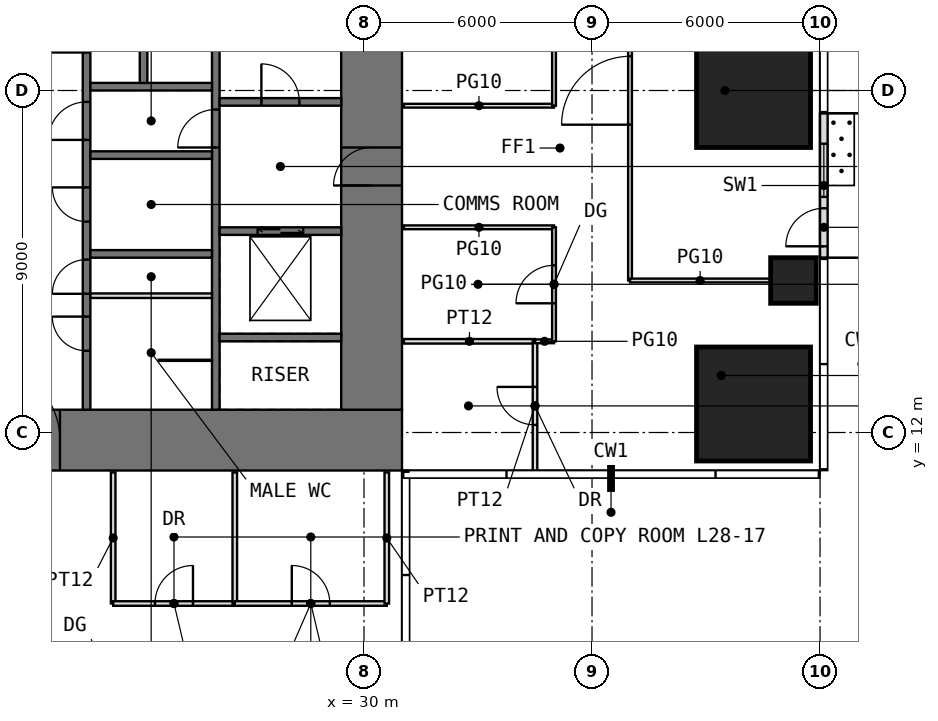
"""IFC4 building model, lengths in metres.
Left out: names, types, materials, properties, quantities, classifications, styles, units other than length and angle.
Written with IfcOpenShell. Run it as: python <this file> out.ifc"""

import sys

from ifc_helpers import new_model, si_unit, direction, frame, frame_2d, origin, origin_2d, place, context, subcontext, project, spatial, rectangle, extrude, element, fill, save


model = new_model("IFC4")
c1 = context("Model", 3, precision=1e-05, world=origin(), true_north=direction((0.0, 1.0)))
c2 = subcontext(c1, "Body", "Model", "MODEL_VIEW")
j1 = project(units=[si_unit("LENGTHUNIT", "METRE"), si_unit("PLANEANGLEUNIT", "RADIAN")], contexts=[c1])
p1 = place(None, origin())
s1 = spatial("IfcSite", under=j1, at=p1, CompositionType="ELEMENT")
p2 = place(p1, origin())
s2 = spatial("IfcBuilding", under=s1, at=p2, CompositionType="ELEMENT")
p3 = place(p2, frame((0.0, 0.0, 120.5)))
s3 = spatial("IfcBuildingStorey", under=s2, at=p3, CompositionType="ELEMENT", Elevation=120.5)
p4 = place(p3, frame((40.25, 12.75, 0.0), z_axis=(0.0, 0.0, 1.0), x_axis=(1.0, 0.0, 0.0)))
e1 = element("IfcColumn", 1, at=p4, inside=s3, PredefinedType="COLUMN", context=c2, shape_type="SweptSolid", body=[
    extrude(rectangle(XDim=3.0, YDim=3.0, at=origin_2d()), origin(), (0.0, 0.0, 1.0), 4.0),
])
p5 = place(p3, frame((41.3, 16.0, 0.0), z_axis=(0.0, 0.0, 1.0), x_axis=(1.0, 0.0, 0.0)))
e2 = element("IfcColumn", 2, at=p5, inside=s3, PredefinedType="COLUMN", context=c2, shape_type="SweptSolid", body=[
    extrude(rectangle(XDim=1.2, YDim=1.2, at=origin_2d()), origin(), (0.0, 0.0, 1.0), 4.0),
])
p6 = place(p3, frame((40.25, 21.0, 0.0), z_axis=(0.0, 0.0, 1.0), x_axis=(1.0, 0.0, 0.0)))
e3 = element("IfcColumn", 3, at=p6, inside=s3, PredefinedType="COLUMN", context=c2, shape_type="SweptSolid", body=[
    extrude(rectangle(XDim=3.0, YDim=3.0, at=origin_2d()), origin(), (0.0, 0.0, 1.0), 4.0),
])
p7 = place(p3, frame((42.1, 16.6, 0.0), z_axis=(0.0, 0.0, 1.0), x_axis=(0.0, 1.0, 0.0)))
e4 = element("IfcWall", 4, at=p7, inside=s3, PredefinedType="USERDEFINED", context=c2, shape_type="SweptSolid", body=[
    extrude(rectangle(XDim=3.8, YDim=0.2, at=frame_2d((1.9, 0.0))), origin(), (0.0, 0.0, 1.0), 3.75),
])
p8 = place(p7, frame((0.3, 0.0, 0.0)))
e5 = element("IfcOpeningElement", 5, at=p8, cuts=e4, PredefinedType="OPENING", context=c2, shape_type="SweptSolid", body=[
    extrude(rectangle(XDim=1.0, YDim=2.4, at=frame_2d((0.5, 1.2))), frame((0.0, 0.11, 0.0), z_axis=(0.0, -1.0, 0.0), x_axis=(1.0, 0.0, 0.0)), (0.0, 0.0, 1.0), 0.22),
])
p9 = place(p7, frame((1.6, 0.0, 0.3)))
e6 = element("IfcOpeningElement", 6, at=p9, cuts=e4, PredefinedType="OPENING", context=c2, shape_type="SweptSolid", body=[
    extrude(rectangle(XDim=1.4, YDim=2.7, at=frame_2d((0.7, 1.35))), frame((0.0, 0.11, 0.0), z_axis=(0.0, -1.0, 0.0), x_axis=(1.0, 0.0, 0.0)), (0.0, 0.0, 1.0), 0.22),
])
p10 = place(p3, frame((11.0, 11.8, -0.05), z_axis=(0.0, 0.0, 1.0), x_axis=(1.0, 0.0, 0.0)))
e7 = element("IfcWall", 7, at=p10, inside=s3, PredefinedType="SHEAR", context=c2, shape_type="SweptSolid", body=[
    extrude(rectangle(XDim=20.0, YDim=1.6, at=frame_2d((10.0, 0.0))), origin(), (0.0, 0.0, 1.0), 4.0),
])
p11 = place(p10, frame((9.0, 0.0, 0.05)))
e8 = element("IfcOpeningElement", 8, at=p11, cuts=e7, PredefinedType="OPENING", context=c2, shape_type="SweptSolid", body=[
    extrude(rectangle(XDim=2.0, YDim=2.2, at=frame_2d((1.0, 1.1))), frame((0.0, 0.81, 0.0), z_axis=(0.0, -1.0, 0.0), x_axis=(1.0, 0.0, 0.0)), (0.0, 0.0, 1.0), 1.62),
])
p12 = place(p3, frame((30.2, 12.6, -0.05), z_axis=(0.0, 0.0, 1.0), x_axis=(0.0, 1.0, 0.0)))
e9 = element("IfcWall", 9, at=p12, inside=s3, PredefinedType="SHEAR", context=c2, shape_type="SweptSolid", body=[
    extrude(rectangle(XDim=16.8, YDim=1.6, at=frame_2d((8.4, 0.0))), origin(), (0.0, 0.0, 1.0), 4.0),
])
p13 = place(p12, frame((5.9, 0.0, 0.05)))
e10 = element("IfcOpeningElement", 10, at=p13, cuts=e9, PredefinedType="OPENING", context=c2, shape_type="SweptSolid", body=[
    extrude(rectangle(XDim=1.0, YDim=2.2, at=frame_2d((0.5, 1.1))), frame((0.0, 0.81, 0.0), z_axis=(0.0, -1.0, 0.0), x_axis=(1.0, 0.0, 0.0)), (0.0, 0.0, 1.0), 1.62),
])
p14 = place(p3, frame((22.7, 12.6, -0.05), z_axis=(0.0, 0.0, 1.0), x_axis=(0.0, 1.0, 0.0)))
e11 = element("IfcWall", 11, at=p14, inside=s3, PredefinedType="SHEAR", context=c2, shape_type="SweptSolid", body=[
    extrude(rectangle(XDim=16.8, YDim=0.2, at=frame_2d((8.4, 0.0))), origin(), (0.0, 0.0, 1.0), 4.0),
])
p15 = place(p14, frame((3.05, 0.0, 0.05)))
e12 = element("IfcOpeningElement", 12, at=p15, cuts=e11, PredefinedType="OPENING", context=c2, shape_type="SweptSolid", body=[
    extrude(rectangle(XDim=0.9, YDim=2.2, at=frame_2d((0.45, 1.1))), frame((0.0, 0.11, 0.0), z_axis=(0.0, -1.0, 0.0), x_axis=(1.0, 0.0, 0.0)), (0.0, 0.0, 1.0), 0.22),
])
p16 = place(p14, frame((7.1, 0.0, 0.05)))
e13 = element("IfcOpeningElement", 13, at=p16, cuts=e11, PredefinedType="OPENING", context=c2, shape_type="SweptSolid", body=[
    extrude(rectangle(XDim=1.0, YDim=2.2, at=frame_2d((0.5, 1.1))), frame((0.0, 0.11, 0.0), z_axis=(0.0, -1.0, 0.0), x_axis=(1.0, 0.0, 0.0)), (0.0, 0.0, 1.0), 0.22),
])
p17 = place(p14, frame((1.55, 0.0, 0.05)))
e14 = element("IfcOpeningElement", 14, at=p17, cuts=e11, PredefinedType="OPENING", context=c2, shape_type="SweptSolid", body=[
    extrude(rectangle(XDim=0.9, YDim=2.2, at=frame_2d((0.45, 1.1))), frame((0.0, 0.11, 0.0), z_axis=(0.0, -1.0, 0.0), x_axis=(1.0, 0.0, 0.0)), (0.0, 0.0, 1.0), 0.22),
])
p18 = place(p14, frame((4.95, 0.0, 0.05)))
e15 = element("IfcOpeningElement", 15, at=p18, cuts=e11, PredefinedType="OPENING", context=c2, shape_type="SweptSolid", body=[
    extrude(rectangle(XDim=0.9, YDim=2.2, at=frame_2d((0.45, 1.1))), frame((0.0, 0.11, 0.0), z_axis=(0.0, -1.0, 0.0), x_axis=(1.0, 0.0, 0.0)), (0.0, 0.0, 1.0), 0.22),
])
p19 = place(p14, frame((9.4, 0.0, 0.05)))
e16 = element("IfcOpeningElement", 16, at=p19, cuts=e11, PredefinedType="OPENING", context=c2, shape_type="SweptSolid", body=[
    extrude(rectangle(XDim=1.0, YDim=2.2, at=frame_2d((0.5, 1.1))), frame((0.0, 0.11, 0.0), z_axis=(0.0, -1.0, 0.0), x_axis=(1.0, 0.0, 0.0)), (0.0, 0.0, 1.0), 0.22),
])
p20 = place(p3, frame((26.1, 12.6, -0.05), z_axis=(0.0, 0.0, 1.0), x_axis=(0.0, 1.0, 0.0)))
e17 = element("IfcWall", 17, at=p20, inside=s3, PredefinedType="SHEAR", context=c2, shape_type="SweptSolid", body=[
    extrude(rectangle(XDim=16.8, YDim=0.2, at=frame_2d((8.4, 0.0))), origin(), (0.0, 0.0, 1.0), 4.0),
])
p21 = place(p20, frame((6.9, 0.0, 0.05)))
e18 = element("IfcOpeningElement", 18, at=p21, cuts=e17, PredefinedType="OPENING", context=c2, shape_type="SweptSolid", body=[
    extrude(rectangle(XDim=1.0, YDim=2.2, at=frame_2d((0.5, 1.1))), frame((0.0, 0.11, 0.0), z_axis=(0.0, -1.0, 0.0), x_axis=(1.0, 0.0, 0.0)), (0.0, 0.0, 1.0), 0.22),
])
for number, where, z_axis, x_axis in (
    (19, (22.8, 16.7, -0.05), (0.0, 0.0, 1.0), (1.0, 0.0, 0.0)),
    (20, (22.8, 19.3, -0.05), (0.0, 0.0, 1.0), (1.0, 0.0, 0.0)),
    (21, (22.8, 21.1, -0.05), (0.0, 0.0, 1.0), (1.0, 0.0, 0.0)),
    (22, (26.2, 14.5, -0.05), (0.0, 0.0, 1.0), (1.0, 0.0, 0.0)),
):
    element("IfcWall", number, at=place(p3, frame(where, z_axis=z_axis, x_axis=x_axis)), inside=s3, PredefinedType="SHEAR", context=c2, shape_type="SweptSolid", body=[
        extrude(rectangle(XDim=3.2, YDim=0.2, at=frame_2d((1.6, 0.0))), origin(), (0.0, 0.0, 1.0), 4.0),
    ])
p22 = place(p3, frame((26.2, 17.3, -0.05), z_axis=(0.0, 0.0, 1.0), x_axis=(1.0, 0.0, 0.0)))
e23 = element("IfcWall", 23, at=p22, inside=s3, PredefinedType="SHEAR", context=c2, shape_type="SweptSolid", body=[
    extrude(rectangle(XDim=3.2, YDim=0.2, at=frame_2d((1.6, 0.0))), origin(), (0.0, 0.0, 1.0), 4.0),
])
p23 = place(p22, frame((1.0, 0.0, 0.05)))
e24 = element("IfcOpeningElement", 24, at=p23, cuts=e23, PredefinedType="OPENING", context=c2, shape_type="SweptSolid", body=[
    extrude(rectangle(XDim=1.2, YDim=2.2, at=frame_2d((0.6, 1.1))), frame((0.0, 0.11, 0.0), z_axis=(0.0, -1.0, 0.0), x_axis=(1.0, 0.0, 0.0)), (0.0, 0.0, 1.0), 0.22),
])
p24 = place(p3, frame((26.2, 20.7, -0.05), z_axis=(0.0, 0.0, 1.0), x_axis=(1.0, 0.0, 0.0)))
e25 = element("IfcWall", 25, at=p24, inside=s3, PredefinedType="SHEAR", context=c2, shape_type="SweptSolid", body=[
    extrude(rectangle(XDim=3.2, YDim=0.2, at=frame_2d((1.6, 0.0))), origin(), (0.0, 0.0, 1.0), 4.0),
])
p25 = place(p24, frame((1.1, 0.0, 0.05)))
e26 = element("IfcOpeningElement", 26, at=p25, cuts=e25, PredefinedType="OPENING", context=c2, shape_type="SweptSolid", body=[
    extrude(rectangle(XDim=1.0, YDim=2.2, at=frame_2d((0.5, 1.1))), frame((0.0, 0.11, 0.0), z_axis=(0.0, -1.0, 0.0), x_axis=(1.0, 0.0, 0.0)), (0.0, 0.0, 1.0), 0.22),
])
p26 = place(p3, frame((22.8, 15.6, 0.0), z_axis=(0.0, 0.0, 1.0), x_axis=(1.0, 0.0, 0.0)))
e27 = element("IfcWall", 27, at=p26, inside=s3, PredefinedType="PARTITIONING", context=c2, shape_type="SweptSolid", body=[
    extrude(rectangle(XDim=3.2, YDim=0.12, at=frame_2d((1.6, 0.0))), origin(), (0.0, 0.0, 1.0), 3.75),
])
p27 = place(p3, frame((24.6, 13.9, 0.0), z_axis=(0.0, 0.0, 1.0), x_axis=(1.0, 0.0, 0.0)))
e28 = element("IfcWall", 28, at=p27, inside=s3, PredefinedType="PARTITIONING", context=c2, shape_type="SweptSolid", body=[
    extrude(rectangle(XDim=1.4, YDim=0.03, at=frame_2d((0.7, 0.0))), origin(), (0.0, 0.0, 1.0), 3.75),
])
p28 = place(p3, frame((24.2, 21.2, -0.05), z_axis=(0.0, 0.0, 1.0), x_axis=(0.0, 1.0, 0.0)))
e29 = element("IfcWall", 29, at=p28, inside=s3, PredefinedType="SHEAR", context=c2, shape_type="SweptSolid", body=[
    extrude(rectangle(XDim=2.6, YDim=0.2, at=frame_2d((1.3, 0.0))), origin(), (0.0, 0.0, 1.0), 4.0),
])
p29 = place(p28, frame((0.85, 0.0, 0.05)))
e30 = element("IfcOpeningElement", 30, at=p29, cuts=e29, PredefinedType="OPENING", context=c2, shape_type="SweptSolid", body=[
    extrude(rectangle(XDim=0.9, YDim=2.2, at=frame_2d((0.45, 1.1))), frame((0.0, 0.11, 0.0), z_axis=(0.0, -1.0, 0.0), x_axis=(1.0, 0.0, 0.0)), (0.0, 0.0, 1.0), 0.22),
])
p30 = place(p3, frame((23.4, 7.5, 0.0), z_axis=(0.0, 0.0, 1.0), x_axis=(0.0, 1.0, 0.0)))
e31 = element("IfcWall", 31, at=p30, inside=s3, PredefinedType="PARTITIONING", context=c2, shape_type="SweptSolid", body=[
    extrude(rectangle(XDim=3.45, YDim=0.12, at=frame_2d((1.725, 0.0))), origin(), (0.0, 0.0, 1.0), 3.75),
])
p31 = place(p3, frame((23.4, 7.5, 0.0), z_axis=(0.0, 0.0, 1.0), x_axis=(1.0, 0.0, 0.0)))
e32 = element("IfcWall", 32, at=p31, inside=s3, PredefinedType="PARTITIONING", context=c2, shape_type="SweptSolid", body=[
    extrude(rectangle(XDim=3.2, YDim=0.12, at=frame_2d((1.6, 0.0))), origin(), (0.0, 0.0, 1.0), 3.75),
])
p32 = place(p31, frame((1.1, 0.0, 0.0)))
e33 = element("IfcOpeningElement", 33, at=p32, cuts=e32, PredefinedType="OPENING", context=c2, shape_type="SweptSolid", body=[
    extrude(rectangle(XDim=1.0, YDim=2.2, at=frame_2d((0.5, 1.1))), frame((0.0, 0.07, 0.0), z_axis=(0.0, -1.0, 0.0), x_axis=(1.0, 0.0, 0.0)), (0.0, 0.0, 1.0), 0.14),
])
p33 = place(p3, frame((26.6, 7.5, 0.0), z_axis=(0.0, 0.0, 1.0), x_axis=(0.0, 1.0, 0.0)))
e34 = element("IfcWall", 34, at=p33, inside=s3, PredefinedType="PARTITIONING", context=c2, shape_type="SweptSolid", body=[
    extrude(rectangle(XDim=3.45, YDim=0.12, at=frame_2d((1.725, 0.0))), origin(), (0.0, 0.0, 1.0), 3.75),
])
p34 = place(p3, frame((26.6, 7.5, 0.0), z_axis=(0.0, 0.0, 1.0), x_axis=(1.0, 0.0, 0.0)))
e35 = element("IfcWall", 35, at=p34, inside=s3, PredefinedType="PARTITIONING", context=c2, shape_type="SweptSolid", body=[
    extrude(rectangle(XDim=4.0, YDim=0.12, at=frame_2d((2.0, 0.0))), origin(), (0.0, 0.0, 1.0), 3.75),
])
p35 = place(p34, frame((1.5, 0.0, 0.0)))
e36 = element("IfcOpeningElement", 36, at=p35, cuts=e35, PredefinedType="OPENING", context=c2, shape_type="SweptSolid", body=[
    extrude(rectangle(XDim=1.0, YDim=2.2, at=frame_2d((0.5, 1.1))), frame((0.0, 0.07, 0.0), z_axis=(0.0, -1.0, 0.0), x_axis=(1.0, 0.0, 0.0)), (0.0, 0.0, 1.0), 0.14),
])
for number, where, z_axis, x_axis in (
    (37, (30.6, 7.5, 0.0), (0.0, 0.0, 1.0), (0.0, 1.0, 0.0)),
    (38, (31.05, 14.4, 0.0), (0.0, 0.0, 1.0), (1.0, 0.0, 0.0)),
):
    element("IfcWall", number, at=place(p3, frame(where, z_axis=z_axis, x_axis=x_axis)), inside=s3, PredefinedType="PARTITIONING", context=c2, shape_type="SweptSolid", body=[
        extrude(rectangle(XDim=3.45, YDim=0.12, at=frame_2d((1.725, 0.0))), origin(), (0.0, 0.0, 1.0), 3.75),
    ])
for number, where, z_axis, x_axis in (
    (39, (31.05, 17.4, 0.0), (0.0, 0.0, 1.0), (1.0, 0.0, 0.0)),
    (40, (31.05, 20.6, 0.0), (0.0, 0.0, 1.0), (1.0, 0.0, 0.0)),
):
    element("IfcWall", number, at=place(p3, frame(where, z_axis=z_axis, x_axis=x_axis)), inside=s3, PredefinedType="PARTITIONING", context=c2, shape_type="SweptSolid", body=[
        extrude(rectangle(XDim=3.95, YDim=0.1, at=frame_2d((1.975, 0.0))), origin(), (0.0, 0.0, 1.0), 3.75),
    ])
p36 = place(p3, frame((34.5, 11.0, 0.0), z_axis=(0.0, 0.0, 1.0), x_axis=(0.0, 1.0, 0.0)))
e41 = element("IfcWall", 41, at=p36, inside=s3, PredefinedType="PARTITIONING", context=c2, shape_type="SweptSolid", body=[
    extrude(rectangle(XDim=3.4, YDim=0.12, at=frame_2d((1.7, 0.0))), origin(), (0.0, 0.0, 1.0), 3.75),
])
p37 = place(p36, frame((1.2, 0.0, 0.0)))
e42 = element("IfcOpeningElement", 42, at=p37, cuts=e41, PredefinedType="OPENING", context=c2, shape_type="SweptSolid", body=[
    extrude(rectangle(XDim=1.0, YDim=2.2, at=frame_2d((0.5, 1.1))), frame((0.0, 0.07, 0.0), z_axis=(0.0, -1.0, 0.0), x_axis=(1.0, 0.0, 0.0)), (0.0, 0.0, 1.0), 0.14),
])
p38 = place(p3, frame((34.5, 14.4, 0.0), z_axis=(0.0, 0.0, 1.0), x_axis=(1.0, 0.0, 0.0)))
e43 = element("IfcWall", 43, at=p38, inside=s3, PredefinedType="PARTITIONING", context=c2, shape_type="SweptSolid", body=[
    extrude(rectangle(XDim=0.5, YDim=0.1, at=frame_2d((0.25, 0.0))), origin(), (0.0, 0.0, 1.0), 3.75),
])
p39 = place(p3, frame((35.0, 14.4, 0.0), z_axis=(0.0, 0.0, 1.0), x_axis=(0.0, 1.0, 0.0)))
e44 = element("IfcWall", 44, at=p39, inside=s3, PredefinedType="PARTITIONING", context=c2, shape_type="SweptSolid", body=[
    extrude(rectangle(XDim=3.0, YDim=0.1, at=frame_2d((1.5, 0.0))), origin(), (0.0, 0.0, 1.0), 3.75),
])
p40 = place(p39, frame((1.0, 0.0, 0.0)))
e45 = element("IfcOpeningElement", 45, at=p40, cuts=e44, PredefinedType="OPENING", context=c2, shape_type="SweptSolid", body=[
    extrude(rectangle(XDim=1.0, YDim=2.4, at=frame_2d((0.5, 1.2))), frame((0.0, 0.06, 0.0), z_axis=(0.0, -1.0, 0.0), x_axis=(1.0, 0.0, 0.0)), (0.0, 0.0, 1.0), 0.12),
])
p41 = place(p3, frame((35.0, 20.6, 0.0), z_axis=(0.0, 0.0, 1.0), x_axis=(0.0, 1.0, 0.0)))
e46 = element("IfcWall", 46, at=p41, inside=s3, PredefinedType="PARTITIONING", context=c2, shape_type="SweptSolid", body=[
    extrude(rectangle(XDim=5.2, YDim=0.1, at=frame_2d((2.6, 0.0))), origin(), (0.0, 0.0, 1.0), 3.75),
])
p42 = place(p41, frame((2.1, 0.0, 0.0)))
e47 = element("IfcOpeningElement", 47, at=p42, cuts=e46, PredefinedType="OPENING", context=c2, shape_type="SweptSolid", body=[
    extrude(rectangle(XDim=1.0, YDim=2.4, at=frame_2d((0.5, 1.2))), frame((0.0, 0.06, 0.0), z_axis=(0.0, -1.0, 0.0), x_axis=(1.0, 0.0, 0.0)), (0.0, 0.0, 1.0), 0.12),
])
p43 = place(p3, frame((37.0, 16.0, 0.0), z_axis=(0.0, 0.0, 1.0), x_axis=(0.0, 1.0, 0.0)))
e48 = element("IfcWall", 48, at=p43, inside=s3, PredefinedType="PARTITIONING", context=c2, shape_type="SweptSolid", body=[
    extrude(rectangle(XDim=10.0, YDim=0.1, at=frame_2d((5.0, 0.0))), origin(), (0.0, 0.0, 1.0), 3.75),
])
p44 = place(p43, frame((4.1, 0.0, 0.0)))
e49 = element("IfcOpeningElement", 49, at=p44, cuts=e48, PredefinedType="OPENING", context=c2, shape_type="SweptSolid", body=[
    extrude(rectangle(XDim=1.8, YDim=2.4, at=frame_2d((0.9, 1.2))), frame((0.0, 0.06, 0.0), z_axis=(0.0, -1.0, 0.0), x_axis=(1.0, 0.0, 0.0)), (0.0, 0.0, 1.0), 0.12),
])
p45 = place(p3, frame((37.0, 16.0, 0.0), z_axis=(0.0, 0.0, 1.0), x_axis=(1.0, 0.0, 0.0)))
e50 = element("IfcWall", 50, at=p45, inside=s3, PredefinedType="PARTITIONING", context=c2, shape_type="SweptSolid", body=[
    extrude(rectangle(XDim=3.69, YDim=0.1, at=frame_2d((1.845, 0.0))), origin(), (0.0, 0.0, 1.0), 3.75),
])
p46 = place(p8, origin())
e51 = element("IfcDoor", 51, at=p46, inside=s3, OperationType="SINGLE_SWING_LEFT", PredefinedType="DOOR", context=c2, shape_type="SweptSolid", body=[
    extrude(rectangle(XDim=1.0, YDim=2.4, at=frame_2d((0.5, 1.2))), frame((0.0, 0.025, 0.0), z_axis=(0.0, -1.0, 0.0), x_axis=(1.0, 0.0, 0.0)), (0.0, 0.0, 1.0), 0.05),
])
fill(e5, e51)
p47 = place(p9, origin())
e52 = element("IfcWindow", 52, at=p47, inside=s3, PartitioningType="SINGLE_PANEL", PredefinedType="WINDOW", context=c2, shape_type="SweptSolid", body=[
    extrude(rectangle(XDim=1.4, YDim=2.7, at=frame_2d((0.7, 1.35))), frame((0.0, 0.03, 0.0), z_axis=(0.0, -1.0, 0.0), x_axis=(1.0, 0.0, 0.0)), (0.0, 0.0, 1.0), 0.06),
])
fill(e6, e52)
p48 = place(p11, origin())
e53 = element("IfcDoor", 53, at=p48, inside=s3, OperationType="DOUBLE_DOOR_SINGLE_SWING", PredefinedType="DOOR", context=c2, shape_type="SweptSolid", body=[
    extrude(rectangle(XDim=2.0, YDim=2.2, at=frame_2d((1.0, 1.1))), frame((0.0, 0.025, 0.0), z_axis=(0.0, -1.0, 0.0), x_axis=(1.0, 0.0, 0.0)), (0.0, 0.0, 1.0), 0.05),
])
fill(e8, e53)
p49 = place(p15, origin())
e54 = element("IfcDoor", 54, at=p49, inside=s3, OperationType="SINGLE_SWING_LEFT", PredefinedType="DOOR", context=c2, shape_type="SweptSolid", body=[
    extrude(rectangle(XDim=0.9, YDim=2.2, at=frame_2d((0.45, 1.1))), frame((0.0, 0.025, 0.0), z_axis=(0.0, -1.0, 0.0), x_axis=(1.0, 0.0, 0.0)), (0.0, 0.0, 1.0), 0.05),
])
fill(e12, e54)
p50 = place(p13, origin())
e55 = element("IfcDoor", 55, at=p50, inside=s3, OperationType="SINGLE_SWING_LEFT", PredefinedType="DOOR", context=c2, shape_type="SweptSolid", body=[
    extrude(rectangle(XDim=1.0, YDim=2.2, at=frame_2d((0.5, 1.1))), frame((0.0, 0.025, 0.0), z_axis=(0.0, -1.0, 0.0), x_axis=(1.0, 0.0, 0.0)), (0.0, 0.0, 1.0), 0.05),
])
fill(e10, e55)
p51 = place(p25, origin())
e56 = element("IfcDoor", 56, at=p51, inside=s3, OperationType="SINGLE_SWING_LEFT", PredefinedType="DOOR", context=c2, shape_type="SweptSolid", body=[
    extrude(rectangle(XDim=1.0, YDim=2.2, at=frame_2d((0.5, 1.1))), frame((0.0, 0.025, 0.0), z_axis=(0.0, -1.0, 0.0), x_axis=(1.0, 0.0, 0.0)), (0.0, 0.0, 1.0), 0.05),
])
fill(e26, e56)
p52 = place(p21, origin())
e57 = element("IfcDoor", 57, at=p52, inside=s3, OperationType="SINGLE_SWING_LEFT", PredefinedType="DOOR", context=c2, shape_type="SweptSolid", body=[
    extrude(rectangle(XDim=1.0, YDim=2.2, at=frame_2d((0.5, 1.1))), frame((0.0, 0.025, 0.0), z_axis=(0.0, -1.0, 0.0), x_axis=(1.0, 0.0, 0.0)), (0.0, 0.0, 1.0), 0.05),
])
fill(e18, e57)
p53 = place(p16, origin())
e58 = element("IfcDoor", 58, at=p53, inside=s3, OperationType="SINGLE_SWING_LEFT", PredefinedType="DOOR", context=c2, shape_type="SweptSolid", body=[
    extrude(rectangle(XDim=1.0, YDim=2.2, at=frame_2d((0.5, 1.1))), frame((0.0, 0.025, 0.0), z_axis=(0.0, -1.0, 0.0), x_axis=(1.0, 0.0, 0.0)), (0.0, 0.0, 1.0), 0.05),
])
fill(e13, e58)
p54 = place(p17, origin())
e59 = element("IfcDoor", 59, at=p54, inside=s3, OperationType="SINGLE_SWING_RIGHT", PredefinedType="DOOR", context=c2, shape_type="SweptSolid", body=[
    extrude(rectangle(XDim=0.9, YDim=2.2, at=frame_2d((0.45, 1.1))), frame((0.0, 0.025, 0.0), z_axis=(0.0, -1.0, 0.0), x_axis=(1.0, 0.0, 0.0)), (0.0, 0.0, 1.0), 0.05),
])
fill(e14, e59)
p55 = place(p18, origin())
e60 = element("IfcDoor", 60, at=p55, inside=s3, OperationType="SINGLE_SWING_RIGHT", PredefinedType="DOOR", context=c2, shape_type="SweptSolid", body=[
    extrude(rectangle(XDim=0.9, YDim=2.2, at=frame_2d((0.45, 1.1))), frame((0.0, 0.025, 0.0), z_axis=(0.0, -1.0, 0.0), x_axis=(1.0, 0.0, 0.0)), (0.0, 0.0, 1.0), 0.05),
])
fill(e15, e60)
p56 = place(p32, origin())
e61 = element("IfcDoor", 61, at=p56, inside=s3, OperationType="SINGLE_SWING_RIGHT", PredefinedType="DOOR", context=c2, shape_type="SweptSolid", body=[
    extrude(rectangle(XDim=1.0, YDim=2.2, at=frame_2d((0.5, 1.1))), frame((0.0, 0.025, 0.0), z_axis=(0.0, -1.0, 0.0), x_axis=(1.0, 0.0, 0.0)), (0.0, 0.0, 1.0), 0.05),
])
fill(e33, e61)
p57 = place(p35, origin())
e62 = element("IfcDoor", 62, at=p57, inside=s3, OperationType="SINGLE_SWING_LEFT", PredefinedType="DOOR", context=c2, shape_type="SweptSolid", body=[
    extrude(rectangle(XDim=1.0, YDim=2.2, at=frame_2d((0.5, 1.1))), frame((0.0, 0.025, 0.0), z_axis=(0.0, -1.0, 0.0), x_axis=(1.0, 0.0, 0.0)), (0.0, 0.0, 1.0), 0.05),
])
fill(e36, e62)
p58 = place(p37, origin())
e63 = element("IfcDoor", 63, at=p58, inside=s3, OperationType="SINGLE_SWING_RIGHT", PredefinedType="DOOR", context=c2, shape_type="SweptSolid", body=[
    extrude(rectangle(XDim=1.0, YDim=2.2, at=frame_2d((0.5, 1.1))), frame((0.0, 0.025, 0.0), z_axis=(0.0, -1.0, 0.0), x_axis=(1.0, 0.0, 0.0)), (0.0, 0.0, 1.0), 0.05),
])
fill(e42, e63)
p59 = place(p40, origin())
e64 = element("IfcDoor", 64, at=p59, inside=s3, OperationType="SINGLE_SWING_LEFT", PredefinedType="DOOR", context=c2, shape_type="SweptSolid", body=[
    extrude(rectangle(XDim=1.0, YDim=2.4, at=frame_2d((0.5, 1.2))), frame((0.0, 0.025, 0.0), z_axis=(0.0, -1.0, 0.0), x_axis=(1.0, 0.0, 0.0)), (0.0, 0.0, 1.0), 0.05),
])
fill(e45, e64)
p60 = place(p44, origin())
e65 = element("IfcDoor", 65, at=p60, inside=s3, OperationType="DOUBLE_DOOR_SINGLE_SWING", PredefinedType="DOOR", context=c2, shape_type="SweptSolid", body=[
    extrude(rectangle(XDim=1.8, YDim=2.4, at=frame_2d((0.9, 1.2))), frame((0.0, 0.025, 0.0), z_axis=(0.0, -1.0, 0.0), x_axis=(1.0, 0.0, 0.0)), (0.0, 0.0, 1.0), 0.05),
])
fill(e49, e65)
p61 = place(p23, origin())
e66 = element("IfcDoor", 66, at=p61, inside=s3, OperationType="DOUBLE_DOOR_SLIDING", PredefinedType="DOOR", context=c2, shape_type="SweptSolid", body=[
    extrude(rectangle(XDim=1.2, YDim=2.2, at=frame_2d((0.6, 1.1))), frame((0.0, 0.025, 0.0), z_axis=(0.0, -1.0, 0.0), x_axis=(1.0, 0.0, 0.0)), (0.0, 0.0, 1.0), 0.05),
])
fill(e24, e66)
save(model, sys.argv[1])
